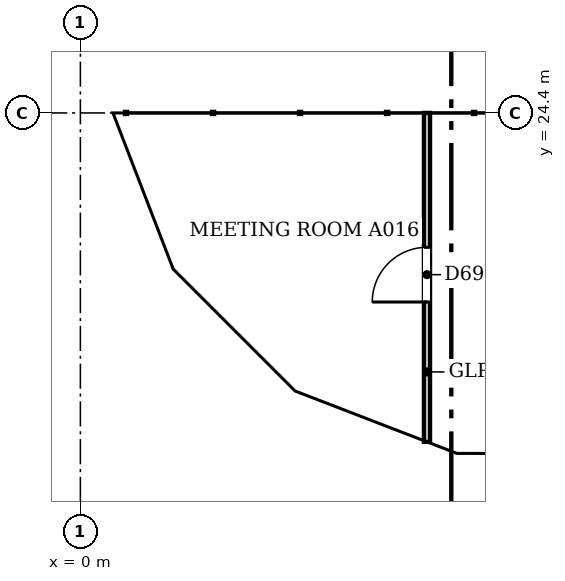
"""IFC4 building model, lengths in metres.
Left out: names, types, materials, properties, quantities, classifications, styles, units other than length and angle.
Written with IfcOpenShell. Run it as: python <this file> out.ifc"""

import sys

from ifc_helpers import new_model, si_unit, direction, frame, frame_2d, origin, place, context, subcontext, project, spatial, polyline, rectangle, outline, extrude, faceted_brep, source, transform, mapped, element, fill, save


model = new_model("IFC4")
c1 = context("Model", 3, precision=1e-05, world=origin(), true_north=direction((0.0, 1.0)))
c2 = subcontext(c1, "Body", "Model", "MODEL_VIEW")
j1 = project(units=[si_unit("LENGTHUNIT", "METRE"), si_unit("PLANEANGLEUNIT", "RADIAN")], contexts=[c1])
p1 = place(None, origin())
s1 = spatial("IfcSite", under=j1, at=p1, CompositionType="ELEMENT")
p2 = place(p1, origin())
s2 = spatial("IfcBuilding", under=s1, at=p2, CompositionType="ELEMENT")
p3 = place(p2, frame((0.0, 0.0, 68.6)))
s3 = spatial("IfcBuildingStorey", under=s2, at=p3, CompositionType="ELEMENT", Elevation=68.6)
m1 = source(origin(), c2, "Body", "Brep", [
    faceted_brep([(6.053, -0.25, 0.0), (3.05, -0.25, 3.8), (0.0, -0.25, 0.0), (0.0, 0.25, 0.0), (3.05, 0.25, 3.8), (6.007, 0.25, 0.059), (6.007, 0.25, 0.0), (6.053, 0.0, 0.0)], [[[0, 1, 2]], [[3, 4, 5, 6]], [[5, 4, 1, 0, 7]], [[4, 3, 2, 1]], [[3, 6, 7, 0, 2]], [[7, 6, 5]]]),
])
p4 = place(p3, frame((0.25, 30.5, 0.0), z_axis=(0.0, 0.0, 1.0), x_axis=(0.0, -1.0, 0.0)))
e1 = element("IfcWall", 1, at=p4, inside=s3, PredefinedType="SOLIDWALL", context=c2, shape_type="MappedRepresentation", body=[
    mapped(m1, transform((0.0, 0.0, 0.0), scale=1.0)),
])
m2 = source(origin(), c2, "Body", "SweptSolid", [
    extrude(outline(polyline([(5.537, 0.25), (3.049, 3.399), (0.521, 0.25), (5.537, 0.25)])), frame((0.0, 0.26, 0.0), z_axis=(0.0, -1.0, 0.0), x_axis=(1.0, 0.0, 0.0)), (0.0, 0.0, 1.0), 0.52),
])
p5 = place(p4, origin())
e2 = element("IfcOpeningElement", 2, at=p5, cuts=e1, PredefinedType="OPENING", context=c2, shape_type="MappedRepresentation", body=[
    mapped(m2, transform((0.0, 0.0, 0.0), scale=1.0)),
])
m3 = source(origin(), c2, "Body", "Brep", [
    faceted_brep([(3.003, -0.25, 3.731), (2.95, -0.25, 3.8), (0.0, -0.25, 0.0), (3.003, -0.25, 0.0), (0.047, 0.25, 0.06), (2.898, 0.25, 3.732), (2.898, 0.25, 0.0), (0.047, 0.25, 0.0), (2.95, 0.0, 3.8), (0.0, 0.0, 0.0)], [[[0, 1, 2, 3]], [[4, 5, 6, 7]], [[8, 1, 0]], [[5, 4, 9, 2, 1, 8]], [[7, 6, 3, 2, 9]], [[7, 9, 4]], [[3, 6, 5, 8, 0]]]),
])
p6 = place(p3, frame((0.25, 24.447, 0.0), z_axis=(0.0, 0.0, 1.0), x_axis=(0.35992665181, -0.932980602862, 0.0)))
e3 = element("IfcWall", 3, at=p6, inside=s3, PredefinedType="SOLIDWALL", context=c2, shape_type="MappedRepresentation", body=[
    mapped(m3, transform((0.0, 0.0, 0.0), scale=1.0)),
])
m4 = source(origin(), c2, "Body", "SweptSolid", [
    extrude(outline(polyline([(2.75, 3.135), (0.511, 0.25), (2.75, 0.25), (2.75, 3.135)])), frame((0.0, 0.26, 0.0), z_axis=(0.0, -1.0, 0.0), x_axis=(1.0, 0.0, 0.0)), (0.0, 0.0, 1.0), 0.52),
])
p7 = place(p6, origin())
e4 = element("IfcOpeningElement", 4, at=p7, cuts=e3, PredefinedType="OPENING", context=c2, shape_type="MappedRepresentation", body=[
    mapped(m4, transform((0.0, 0.0, 0.0), scale=1.0)),
])
m5 = source(origin(), c2, "Body", "Brep", [
    faceted_brep([(2.997, -0.25, 0.0), (0.053, -0.25, 3.8), (0.0, -0.25, 3.732), (0.0, -0.25, 0.0), (0.106, 0.25, 3.731), (2.944, 0.25, 0.068), (2.944, 0.25, 0.0), (0.106, 0.25, 0.0), (0.053, 0.0, 3.8), (2.997, 0.0, 0.0)], [[[0, 1, 2, 3]], [[4, 5, 6, 7]], [[5, 4, 8, 1, 0, 9]], [[2, 1, 8]], [[7, 6, 9, 0, 3]], [[7, 3, 2, 8, 4]], [[9, 6, 5]]]),
])
p8 = place(p3, frame((1.274, 21.731, 0.0), z_axis=(0.0, 0.0, 1.0), x_axis=(0.707147509625, -0.707066050402, 0.0)))
e5 = element("IfcWall", 5, at=p8, inside=s3, PredefinedType="SOLIDWALL", context=c2, shape_type="MappedRepresentation", body=[
    mapped(m5, transform((0.0, 0.0, 0.0), scale=1.0)),
])
m6 = source(origin(), c2, "Body", "SweptSolid", [
    extrude(outline(polyline([(2.487, 0.25), (0.253, 3.134), (0.253, 0.25), (2.487, 0.25)])), frame((0.0, 0.26, 0.0), z_axis=(0.0, -1.0, 0.0), x_axis=(1.0, 0.0, 0.0)), (0.0, 0.0, 1.0), 0.52),
])
p9 = place(p8, origin())
e6 = element("IfcOpeningElement", 6, at=p9, cuts=e5, PredefinedType="OPENING", context=c2, shape_type="MappedRepresentation", body=[
    mapped(m6, transform((0.0, 0.0, 0.0), scale=1.0)),
])
m7 = source(origin(), c2, "Body", "Brep", [
    faceted_brep([(2.997, -0.25, 3.741), (2.95, -0.25, 3.8), (0.0, -0.25, 0.0), (2.997, -0.25, 0.0), (0.053, 0.25, 0.068), (2.904, 0.25, 3.74), (2.904, 0.25, 0.0), (0.053, 0.25, 0.0), (2.95, 0.0, 3.8), (0.0, 0.0, 0.0)], [[[0, 1, 2, 3]], [[4, 5, 6, 7]], [[8, 1, 0]], [[5, 4, 9, 2, 1, 8]], [[7, 6, 3, 2, 9]], [[7, 9, 4]], [[3, 6, 5, 8, 0]]]),
])
p10 = place(p3, frame((3.394, 19.612, 0.0), z_axis=(0.0, 0.0, 1.0), x_axis=(0.932990326376, -0.359901446078, 0.0)))
e7 = element("IfcWall", 7, at=p10, inside=s3, PredefinedType="SOLIDWALL", context=c2, shape_type="MappedRepresentation", body=[
    mapped(m7, transform((0.0, 0.0, 0.0), scale=1.0)),
])
p11 = place(p10, origin())
e8 = element("IfcOpeningElement", 8, at=p11, cuts=e7, PredefinedType="OPENING", context=c2, shape_type="MappedRepresentation", body=[
    mapped(m4, transform((0.0, 0.0, 0.0), scale=1.0)),
])
m8 = source(origin(), c2, "Body", "Brep", [
    faceted_brep([(3.05, -0.25, 0.0), (0.047, -0.25, 3.8), (0.0, -0.25, 3.74), (0.0, -0.25, 0.0), (0.093, 0.25, 3.741), (3.05, 0.25, 0.0), (0.093, 0.25, 0.0), (0.047, 0.0, 3.8)], [[[0, 1, 2, 3]], [[4, 5, 6]], [[5, 4, 7, 1, 0]], [[2, 1, 7]], [[6, 5, 0, 3]], [[6, 3, 2, 7, 4]]]),
])
p12 = place(p3, frame((6.1, 18.55, 0.0), z_axis=(0.0, 0.0, 1.0), x_axis=(1.0, 0.0, 0.0)))
e9 = element("IfcWall", 9, at=p12, inside=s3, PredefinedType="SOLIDWALL", context=c2, shape_type="MappedRepresentation", body=[
    mapped(m8, transform((0.0, 0.0, 0.0), scale=1.0)),
])
m9 = source(origin(), c2, "Body", "SweptSolid", [
    extrude(outline(polyline([(2.534, 0.25), (0.247, 3.144), (0.247, 0.25), (2.534, 0.25)])), frame((0.0, 0.26, 0.0), z_axis=(0.0, -1.0, 0.0), x_axis=(1.0, 0.0, 0.0)), (0.0, 0.0, 1.0), 0.52),
])
p13 = place(p12, origin())
e10 = element("IfcOpeningElement", 10, at=p13, cuts=e9, PredefinedType="OPENING", context=c2, shape_type="MappedRepresentation", body=[
    mapped(m9, transform((0.0, 0.0, 0.0), scale=1.0)),
])
p14 = place(p2, frame((0.0, 0.0, 72.4)))
s4 = spatial("IfcBuildingStorey", under=s2, at=p14, CompositionType="ELEMENT", Elevation=72.4)
m10 = source(origin(), c2, "Body", "Brep", [
    faceted_brep([(3.003, -0.25, 0.0), (3.05, -0.25, 0.06), (3.05, -0.25, 7.54), (3.003, -0.25, 7.6), (0.0, -0.25, 3.8), (0.0, 0.25, 3.8), (2.957, 0.25, 7.541), (2.957, 0.25, 0.059), (3.003, 0.0, 0.0), (3.003, 0.0, 7.6)], [[[0, 1, 2, 3, 4]], [[5, 6, 7]], [[1, 0, 8]], [[9, 3, 2]], [[6, 5, 4, 3, 9]], [[5, 7, 8, 0, 4]], [[1, 8, 7, 6, 9, 2]]]),
])
p15 = place(p14, frame((0.25, 27.45, -3.8), z_axis=(0.0, 0.0, 1.0), x_axis=(0.0, -1.0, 0.0)))
e11 = element("IfcWall", 11, at=p15, inside=s4, PredefinedType="SOLIDWALL", context=c2, shape_type="MappedRepresentation", body=[
    mapped(m10, transform((0.0, 0.0, 0.0), scale=1.0)),
])
m11 = source(origin(), c2, "Body", "SweptSolid", [
    extrude(outline(polyline([(2.803, 6.944), (0.319, 3.8), (2.803, 0.656), (2.803, 6.944)])), frame((0.0, 0.26, 0.0), z_axis=(0.0, -1.0, 0.0), x_axis=(1.0, 0.0, 0.0)), (0.0, 0.0, 1.0), 0.52),
])
p16 = place(p15, origin())
e12 = element("IfcOpeningElement", 12, at=p16, cuts=e11, PredefinedType="OPENING", context=c2, shape_type="MappedRepresentation", body=[
    mapped(m11, transform((0.0, 0.0, 0.0), scale=1.0)),
])
m12 = source(origin(), c2, "Body", "Brep", [
    faceted_brep([(0.047, -0.25, 0.0), (2.997, -0.25, 3.8), (0.047, -0.25, 7.6), (0.0, -0.25, 7.541), (0.0, -0.25, 0.059), (0.093, 0.25, 7.54), (2.944, 0.25, 3.868), (2.944, 0.25, 3.732), (0.093, 0.25, 0.06), (2.997, 0.0, 3.8), (0.047, 0.0, 0.0), (0.047, 0.0, 7.6)], [[[0, 1, 2, 3, 4]], [[5, 6, 7, 8]], [[8, 7, 9, 1, 0, 10]], [[6, 5, 11, 2, 1, 9]], [[3, 2, 11]], [[10, 0, 4]], [[8, 10, 4, 3, 11, 5]], [[9, 7, 6]]]),
])
p17 = place(p14, frame((0.233, 24.49, -3.8), z_axis=(0.0, 0.0, 1.0), x_axis=(0.359901446078, -0.932990326376, 0.0)))
e13 = element("IfcWall", 13, at=p17, inside=s4, PredefinedType="SOLIDWALL", context=c2, shape_type="MappedRepresentation", body=[
    mapped(m12, transform((0.0, 0.0, 0.0), scale=1.0)),
])
m13 = source(origin(), c2, "Body", "SweptSolid", [
    extrude(outline(polyline([(0.247, 0.665), (2.681, 3.8), (0.247, 6.935), (0.247, 0.665)])), frame((0.0, 0.26, 0.0), z_axis=(0.0, -1.0, 0.0), x_axis=(1.0, 0.0, 0.0)), (0.0, 0.0, 1.0), 0.52),
])
p18 = place(p17, origin())
e14 = element("IfcOpeningElement", 14, at=p18, cuts=e13, PredefinedType="OPENING", context=c2, shape_type="MappedRepresentation", body=[
    mapped(m13, transform((0.0, 0.0, 0.0), scale=1.0)),
])
m14 = source(origin(), c2, "Body", "Brep", [
    faceted_brep([(2.944, -0.25, 0.0), (2.997, -0.25, 0.068), (2.997, -0.25, 7.532), (2.944, -0.25, 7.6), (0.0, -0.25, 3.8), (0.053, 0.25, 3.868), (2.891, 0.25, 7.532), (2.891, 0.25, 0.068), (0.053, 0.25, 3.731), (2.944, 0.0, 0.0), (2.944, 0.0, 7.6), (0.0, 0.0, 3.8)], [[[0, 1, 2, 3, 4]], [[5, 6, 7, 8]], [[1, 0, 9]], [[10, 3, 2]], [[6, 5, 11, 4, 3, 10]], [[8, 7, 9, 0, 4, 11]], [[8, 11, 5]], [[1, 9, 7, 6, 10, 2]]]),
])
p19 = place(p14, frame((1.312, 21.694, -3.8), z_axis=(0.0, 0.0, 1.0), x_axis=(0.707066050402, -0.707147509625, 0.0)))
e15 = element("IfcWall", 15, at=p19, inside=s4, PredefinedType="SOLIDWALL", context=c2, shape_type="MappedRepresentation", body=[
    mapped(m14, transform((0.0, 0.0, 0.0), scale=1.0)),
])
m15 = source(origin(), c2, "Body", "SweptSolid", [
    extrude(outline(polyline([(2.744, 6.934), (0.316, 3.8), (2.744, 0.666), (2.744, 6.934)])), frame((0.0, 0.26, 0.0), z_axis=(0.0, -1.0, 0.0), x_axis=(1.0, 0.0, 0.0)), (0.0, 0.0, 1.0), 0.52),
])
p20 = place(p19, origin())
e16 = element("IfcOpeningElement", 16, at=p20, cuts=e15, PredefinedType="OPENING", context=c2, shape_type="MappedRepresentation", body=[
    mapped(m15, transform((0.0, 0.0, 0.0), scale=1.0)),
])
m16 = source(origin(), c2, "Body", "Brep", [
    faceted_brep([(0.053, -0.25, 0.0), (3.003, -0.25, 3.8), (0.053, -0.25, 7.6), (0.0, -0.25, 7.531), (0.0, -0.25, 0.068), (0.106, 0.25, 7.532), (2.957, 0.25, 3.86), (2.957, 0.25, 3.74), (0.106, 0.25, 0.068), (3.003, 0.0, 3.8), (0.053, 0.0, 0.0), (0.053, 0.0, 7.6)], [[[0, 1, 2, 3, 4]], [[5, 6, 7, 8]], [[8, 7, 9, 1, 0, 10]], [[6, 5, 11, 2, 1, 9]], [[3, 2, 11]], [[10, 0, 4]], [[8, 10, 4, 3, 11, 5]], [[9, 7, 6]]]),
])
p21 = place(p14, frame((3.344, 19.631, -3.8), z_axis=(0.0, 0.0, 1.0), x_axis=(0.933007896601, -0.359855894603, 0.0)))
e17 = element("IfcWall", 17, at=p21, inside=s4, PredefinedType="SOLIDWALL", context=c2, shape_type="MappedRepresentation", body=[
    mapped(m16, transform((0.0, 0.0, 0.0), scale=1.0)),
])
m17 = source(origin(), c2, "Body", "SweptSolid", [
    extrude(outline(polyline([(0.253, 0.665), (2.687, 3.8), (0.253, 6.935), (0.253, 0.665)])), frame((0.0, 0.26, 0.0), z_axis=(0.0, -1.0, 0.0), x_axis=(1.0, 0.0, 0.0)), (0.0, 0.0, 1.0), 0.52),
])
p22 = place(p21, origin())
e18 = element("IfcOpeningElement", 18, at=p22, cuts=e17, PredefinedType="OPENING", context=c2, shape_type="MappedRepresentation", body=[
    mapped(m17, transform((0.0, 0.0, 0.0), scale=1.0)),
])
m18 = source(origin(), c2, "Body", "Brep", [
    faceted_brep([(3.003, -0.25, 0.0), (6.053, -0.25, 3.8), (3.003, -0.25, 7.6), (0.0, -0.25, 3.8), (0.047, 0.25, 3.859), (3.003, 0.25, 7.6), (6.053, 0.25, 3.8), (3.003, 0.25, 0.0), (0.047, 0.25, 3.741), (0.0, 0.0, 3.8)], [[[0, 1, 2, 3]], [[4, 5, 6, 7, 8]], [[7, 6, 1, 0]], [[6, 5, 2, 1]], [[5, 4, 9, 3, 2]], [[8, 7, 0, 3, 9]], [[8, 9, 4]]]),
])
p23 = place(p14, frame((6.146, 18.55, -3.8), z_axis=(0.0, 0.0, 1.0), x_axis=(1.0, 0.0, 0.0)))
e19 = element("IfcWall", 19, at=p23, inside=s4, PredefinedType="SOLIDWALL", context=c2, shape_type="MappedRepresentation", body=[
    mapped(m18, transform((0.0, 0.0, 0.0), scale=1.0)),
])
m19 = source(origin(), c2, "Body", "SweptSolid", [
    extrude(outline(polyline([(3.005, 0.401), (5.733, 3.8), (3.005, 7.199), (0.319, 3.8), (3.005, 0.401)])), frame((0.0, 0.26, 0.0), z_axis=(0.0, -1.0, 0.0), x_axis=(1.0, 0.0, 0.0)), (0.0, 0.0, 1.0), 0.52),
])
p24 = place(p23, origin())
e20 = element("IfcOpeningElement", 20, at=p24, cuts=e19, PredefinedType="OPENING", context=c2, shape_type="MappedRepresentation", body=[
    mapped(m19, transform((0.0, 0.0, 0.0), scale=1.0)),
])
p25 = place(p3, frame((5.7, 18.99, 0.0), z_axis=(0.0, 0.0, 1.0), x_axis=(0.0, 1.0, 0.0)))
e21 = element("IfcWall", 21, at=p25, inside=s3, PredefinedType="PARTITIONING", context=c2, shape_type="SweptSolid", body=[
    extrude(rectangle(XDim=5.41, YDim=0.1, at=frame_2d((2.705, 0.0))), origin(), (0.0, 0.0, 1.0), 3.067),
])
m20 = source(origin(), c2, "Body", "SweptSolid", [
    extrude(rectangle(XDim=0.9, YDim=2.1, at=frame_2d((0.45, 1.05))), frame((0.0, 0.06, 0.0), z_axis=(0.0, -1.0, 0.0), x_axis=(1.0, 0.0, 0.0)), (0.0, 0.0, 1.0), 0.12),
])
p26 = place(p25, frame((2.3, 0.0, 0.0)))
e22 = element("IfcOpeningElement", 22, at=p26, cuts=e21, PredefinedType="OPENING", context=c2, shape_type="MappedRepresentation", body=[
    mapped(m20, transform((0.0, 0.0, 0.0), scale=1.0)),
])
m21 = source(origin(), c2, "Body", "SweptSolid", [
    extrude(rectangle(XDim=0.9, YDim=2.1, at=frame_2d((0.45, 1.05))), frame((0.0, 0.025, 0.0), z_axis=(0.0, -1.0, 0.0), x_axis=(1.0, 0.0, 0.0)), (0.0, 0.0, 1.0), 0.05),
])
p27 = place(p26, origin())
e23 = element("IfcDoor", 23, at=p27, inside=s3, OperationType="SINGLE_SWING_LEFT", PredefinedType="DOOR", context=c2, shape_type="MappedRepresentation", body=[
    mapped(m21, transform((0.0, 0.0, 0.0), scale=1.0)),
])
fill(e22, e23)
save(model, sys.argv[1])
